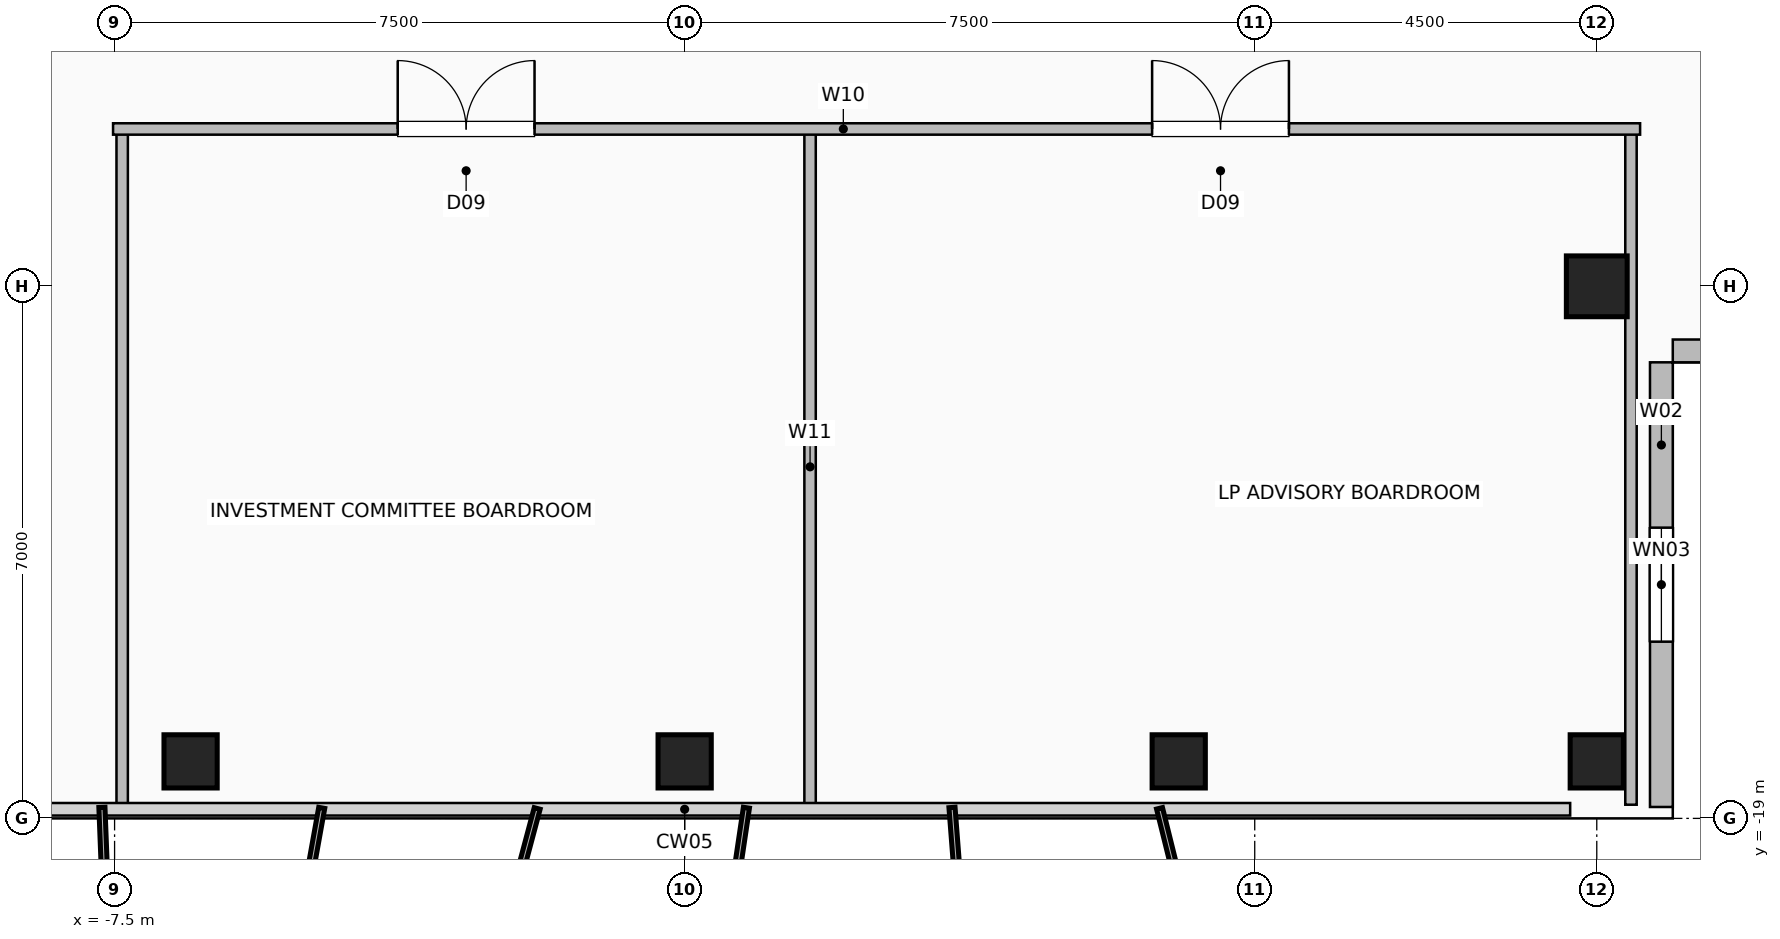
"""IFC4 building model, lengths in metres.
Left out: names, types, materials, properties, quantities, classifications, styles, units other than length and angle.
Written with IfcOpenShell. Run it as: python <this file> out.ifc"""

import sys

from ifc_helpers import new_model, si_unit, direction, frame, frame_2d, origin, origin_2d, place, context, subcontext, project, spatial, rectangle, hollow_rectangle, extrude, element, fill, save


model = new_model("IFC4")
c1 = context("Model", 3, precision=1e-05, world=origin(), true_north=direction((0.0, 1.0)))
c2 = subcontext(c1, "Body", "Model", "MODEL_VIEW")
j1 = project(units=[si_unit("LENGTHUNIT", "METRE"), si_unit("PLANEANGLEUNIT", "RADIAN")], contexts=[c1])
p1 = place(None, origin())
s1 = spatial("IfcSite", under=j1, at=p1, CompositionType="ELEMENT")
p2 = place(p1, origin())
s2 = spatial("IfcBuilding", under=s1, at=p2, CompositionType="ELEMENT")
p3 = place(p2, frame((0.0, 0.0, 282.8)))
s3 = spatial("IfcBuildingStorey", under=s2, at=p3, CompositionType="ELEMENT", Elevation=282.8)
for number, where, z_axis, x_axis in (
    (1, (-6.5, -18.25, 0.0), (0.0, 0.0, 1.0), (1.0, 0.0, 0.0)),
    (2, (0.0, -18.25, 0.0), (0.0, 0.0, 1.0), (1.0, 0.0, 0.0)),
    (3, (6.5, -18.25, 0.0), (0.0, 0.0, 1.0), (1.0, 0.0, 0.0)),
    (4, (12.0, -18.25, 0.0), (0.0, 0.0, 1.0), (1.0, 0.0, 0.0)),
):
    element("IfcColumn", number, at=place(p3, frame(where, z_axis=z_axis, x_axis=x_axis)), inside=s3, PredefinedType="COLUMN", context=c2, shape_type="SweptSolid", body=[
        extrude(hollow_rectangle(XDim=0.7, YDim=0.7, WallThickness=0.035, at=origin_2d()), origin(), (0.0, 0.0, 1.0), 3.6),
    ])
p4 = place(p3, frame((12.0, -12.0, 0.0), z_axis=(0.0, 0.0, 1.0), x_axis=(1.0, 0.0, 0.0)))
e5 = element("IfcColumn", 5, at=p4, inside=s3, PredefinedType="COLUMN", context=c2, shape_type="SweptSolid", body=[
    extrude(hollow_rectangle(XDim=0.8, YDim=0.8, WallThickness=0.04, at=origin_2d()), origin(), (0.0, 0.0, 1.0), 3.6),
])
p5 = place(p3, frame((12.85, -18.85, 0.0), z_axis=(0.0, 0.0, 1.0), x_axis=(0.0, 1.0, 0.0)))
e6 = element("IfcWall", 6, at=p5, inside=s3, PredefinedType="SOLIDWALL", context=c2, shape_type="SweptSolid", body=[
    extrude(rectangle(XDim=5.85, YDim=0.3, at=frame_2d((2.925, 0.0))), origin(), (0.0, 0.0, 1.0), 3.36),
])
p6 = place(p5, frame((2.175, 0.0, 0.9)))
e7 = element("IfcOpeningElement", 7, at=p6, cuts=e6, PredefinedType="OPENING", context=c2, shape_type="SweptSolid", body=[
    extrude(rectangle(XDim=1.5, YDim=1.8, at=frame_2d((0.75, 0.9))), frame((0.0, 0.16, 0.0), z_axis=(0.0, -1.0, 0.0), x_axis=(1.0, 0.0, 0.0)), (0.0, 0.0, 1.0), 0.32),
])
p7 = place(p3, frame((18.85, -12.85, 0.0), z_axis=(0.0, 0.0, 1.0), x_axis=(-1.0, 0.0, 0.0)))
e8 = element("IfcWall", 8, at=p7, inside=s3, PredefinedType="SOLIDWALL", context=c2, shape_type="SweptSolid", body=[
    extrude(rectangle(XDim=5.85, YDim=0.3, at=frame_2d((2.925, 0.0))), origin(), (0.0, 0.0, 1.0), 3.36),
])
for number, where, z_axis, x_axis in (
    (9, (-7.4, -18.82, 0.0), (0.0, 0.0, 1.0), (0.0, 1.0, 0.0)),
    (10, (1.65, -18.82, 0.0), (0.0, 0.0, 1.0), (0.0, 1.0, 0.0)),
    (11, (12.45, -18.82, 0.0), (0.0, 0.0, 1.0), (0.0, 1.0, 0.0)),
):
    element("IfcWall", number, at=place(p3, frame(where, z_axis=z_axis, x_axis=x_axis)), inside=s3, PredefinedType="PARTITIONING", context=c2, shape_type="SweptSolid", body=[
        extrude(rectangle(XDim=8.89, YDim=0.15, at=frame_2d((4.445, 0.0))), origin(), (0.0, 0.0, 1.0), 3.36),
    ])
p8 = place(p3, frame((-7.52, -9.93, 0.0), z_axis=(0.0, 0.0, 1.0), x_axis=(1.0, 0.0, 0.0)))
e12 = element("IfcWall", 12, at=p8, inside=s3, PredefinedType="PARTITIONING", context=c2, shape_type="SweptSolid", body=[
    extrude(rectangle(XDim=20.09, YDim=0.15, at=frame_2d((10.045, 0.0))), origin(), (0.0, 0.0, 1.0), 3.36),
])
p9 = place(p8, frame((3.745, 0.0, 0.0)))
e13 = element("IfcOpeningElement", 13, at=p9, cuts=e12, PredefinedType="OPENING", context=c2, shape_type="SweptSolid", body=[
    extrude(rectangle(XDim=1.8, YDim=2.08, at=frame_2d((0.9, 1.04))), frame((0.0, 0.085, 0.0), z_axis=(0.0, -1.0, 0.0), x_axis=(1.0, 0.0, 0.0)), (0.0, 0.0, 1.0), 0.17),
])
p10 = place(p8, frame((13.67, 0.0, 0.0)))
e14 = element("IfcOpeningElement", 14, at=p10, cuts=e12, PredefinedType="OPENING", context=c2, shape_type="SweptSolid", body=[
    extrude(rectangle(XDim=1.8, YDim=2.08, at=frame_2d((0.9, 1.04))), frame((0.0, 0.085, 0.0), z_axis=(0.0, -1.0, 0.0), x_axis=(1.0, 0.0, 0.0)), (0.0, 0.0, 1.0), 0.17),
])
p11 = place(p6, origin())
e15 = element("IfcWindow", 15, at=p11, inside=s3, PartitioningType="SINGLE_PANEL", PredefinedType="WINDOW", context=c2, shape_type="SweptSolid", body=[
    extrude(rectangle(XDim=1.5, YDim=1.8, at=frame_2d((0.75, 0.9))), frame((0.0, 0.03, 0.0), z_axis=(0.0, -1.0, 0.0), x_axis=(1.0, 0.0, 0.0)), (0.0, 0.0, 1.0), 0.06),
])
fill(e7, e15)
p12 = place(p9, origin())
e16 = element("IfcDoor", 16, at=p12, inside=s3, OperationType="DOUBLE_DOOR_SINGLE_SWING", PredefinedType="DOOR", context=c2, shape_type="SweptSolid", body=[
    extrude(rectangle(XDim=1.8, YDim=2.08, at=frame_2d((0.9, 1.04))), frame((0.0, 0.025, 0.0), z_axis=(0.0, -1.0, 0.0), x_axis=(1.0, 0.0, 0.0)), (0.0, 0.0, 1.0), 0.05),
])
fill(e13, e16)
p13 = place(p10, origin())
e17 = element("IfcDoor", 17, at=p13, inside=s3, OperationType="DOUBLE_DOOR_SINGLE_SWING", PredefinedType="DOOR", context=c2, shape_type="SweptSolid", body=[
    extrude(rectangle(XDim=1.8, YDim=2.08, at=frame_2d((0.9, 1.04))), frame((0.0, 0.025, 0.0), z_axis=(0.0, -1.0, 0.0), x_axis=(1.0, 0.0, 0.0)), (0.0, 0.0, 1.0), 0.05),
])
fill(e14, e17)
save(model, sys.argv[1])
